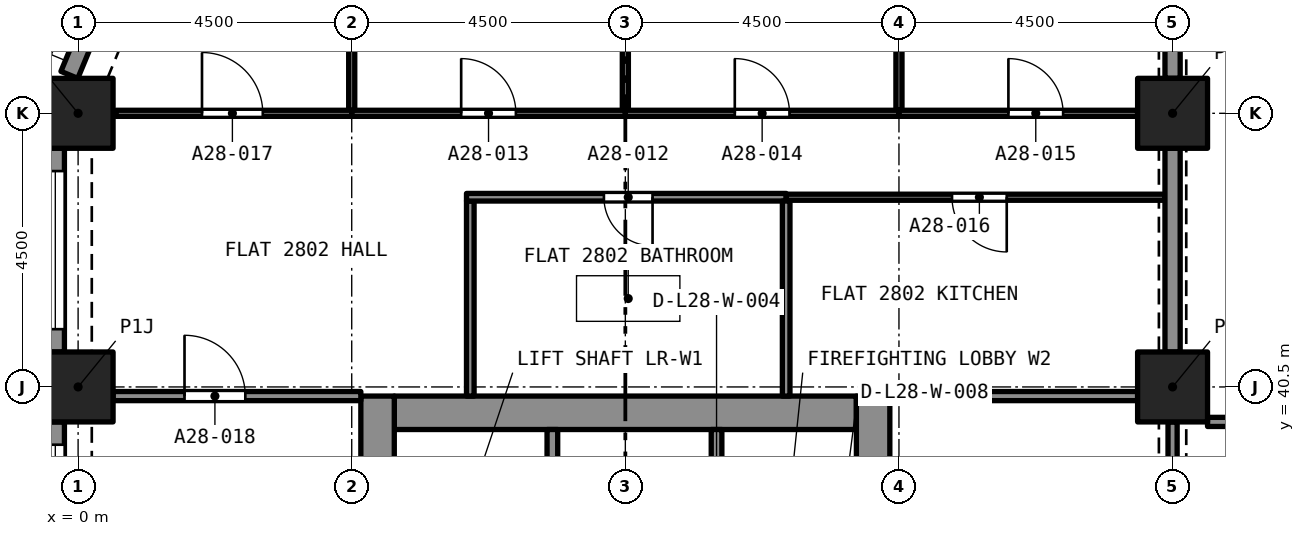
"""IFC4 building model, lengths in metres.
Left out: names, types, materials, properties, quantities, classifications, styles, units other than length and angle.
Written with IfcOpenShell. Run it as: python <this file> out.ifc"""

import sys

from ifc_helpers import new_model, si_unit, direction, frame, frame_2d, origin, origin_2d, place, context, subcontext, project, spatial, rectangle, extrude, element, fill, save


model = new_model("IFC4")
c1 = context("Model", 3, precision=1e-05, world=origin(), true_north=direction((0.0, 1.0)))
c2 = subcontext(c1, "Body", "Model", "MODEL_VIEW")
j1 = project(units=[si_unit("LENGTHUNIT", "METRE"), si_unit("PLANEANGLEUNIT", "RADIAN")], contexts=[c1])
p1 = place(None, origin())
s1 = spatial("IfcSite", under=j1, at=p1, CompositionType="ELEMENT")
p2 = place(p1, origin())
s2 = spatial("IfcBuilding", under=s1, at=p2, CompositionType="ELEMENT")
p3 = place(p2, frame((0.0, 0.0, 102.4)))
s3 = spatial("IfcBuildingStorey", under=s2, at=p3, CompositionType="ELEMENT", Elevation=102.4)
for number, where, z_axis, x_axis in (
    (1, (0.0, 40.5, 0.0), (0.0, 0.0, 1.0), (1.0, 0.0, 0.0)),
    (2, (18.0, 40.5, 0.0), (0.0, 0.0, 1.0), (1.0, 0.0, 0.0)),
    (3, (0.0, 45.0, 0.0), (0.0, 0.0, 1.0), (1.0, 0.0, 0.0)),
    (4, (18.0, 45.0, 0.0), (0.0, 0.0, 1.0), (1.0, 0.0, 0.0)),
):
    element("IfcColumn", number, at=place(p3, frame(where, z_axis=z_axis, x_axis=x_axis)), inside=s3, PredefinedType="COLUMN", context=c2, shape_type="SweptSolid", body=[
        extrude(rectangle(XDim=1.15, YDim=1.15, at=origin_2d()), origin(), (0.0, 0.0, 1.0), 3.2),
    ])
p4 = place(p3, frame((5.2, 40.075, 0.0), z_axis=(0.0, 0.0, 1.0), x_axis=(1.0, 0.0, 0.0)))
e5 = element("IfcWall", 5, at=p4, inside=s3, PredefinedType="SOLIDWALL", context=c2, shape_type="SweptSolid", body=[
    extrude(rectangle(XDim=7.6, YDim=0.55, at=frame_2d((3.8, 0.0))), origin(), (0.0, 0.0, 1.0), 3.2),
])
p5 = place(p3, frame((4.925, 27.15, 0.0), z_axis=(0.0, 0.0, 1.0), x_axis=(0.0, 1.0, 0.0)))
e6 = element("IfcWall", 6, at=p5, inside=s3, PredefinedType="SOLIDWALL", context=c2, shape_type="SweptSolid", body=[
    extrude(rectangle(XDim=13.2, YDim=0.55, at=frame_2d((6.6, 0.0))), origin(), (0.0, 0.0, 1.0), 3.2),
])
p6 = place(p5, frame((8.8, 0.0, 0.0)))
e7 = element("IfcOpeningElement", 7, at=p6, cuts=e6, PredefinedType="OPENING", context=c2, shape_type="SweptSolid", body=[
    extrude(rectangle(XDim=1.2, YDim=2.1, at=frame_2d((0.6, 1.05))), frame((0.0, 0.285, 0.0), z_axis=(0.0, -1.0, 0.0), x_axis=(1.0, 0.0, 0.0)), (0.0, 0.0, 1.0), 0.57),
])
p7 = place(p3, frame((13.075, 27.15, 0.0), z_axis=(0.0, 0.0, 1.0), x_axis=(0.0, 1.0, 0.0)))
e8 = element("IfcWall", 8, at=p7, inside=s3, PredefinedType="SOLIDWALL", context=c2, shape_type="SweptSolid", body=[
    extrude(rectangle(XDim=13.2, YDim=0.55, at=frame_2d((6.6, 0.0))), origin(), (0.0, 0.0, 1.0), 3.2),
])
p8 = place(p7, frame((10.95, 0.0, 0.0)))
e9 = element("IfcOpeningElement", 9, at=p8, cuts=e8, PredefinedType="OPENING", context=c2, shape_type="SweptSolid", body=[
    extrude(rectangle(XDim=1.1, YDim=2.1, at=frame_2d((0.55, 1.05))), frame((0.0, 0.285, 0.0), z_axis=(0.0, -1.0, 0.0), x_axis=(1.0, 0.0, 0.0)), (0.0, 0.0, 1.0), 0.57),
])
p9 = place(p7, frame((8.8, 0.0, 0.0)))
e10 = element("IfcOpeningElement", 10, at=p9, cuts=e8, PredefinedType="OPENING", context=c2, shape_type="SweptSolid", body=[
    extrude(rectangle(XDim=1.2, YDim=2.1, at=frame_2d((0.6, 1.05))), frame((0.0, 0.285, 0.0), z_axis=(0.0, -1.0, 0.0), x_axis=(1.0, 0.0, 0.0)), (0.0, 0.0, 1.0), 0.57),
])
p10 = place(p3, frame((-0.144, 45.632, 0.0), z_axis=(0.0, 0.0, 1.0), x_axis=(0.382723818695, 0.923862802911, 0.0)))
e11 = element("IfcWall", 11, at=p10, inside=s3, PredefinedType="SOLIDWALL", context=c2, shape_type="SweptSolid", body=[
    extrude(rectangle(XDim=2.164, YDim=0.3, at=frame_2d((1.082, 0.0))), origin(), (0.0, 0.0, 1.0), 3.2),
])
p11 = place(p10, frame((0.493, 0.0, 0.45)))
e12 = element("IfcOpeningElement", 12, at=p11, cuts=e11, PredefinedType="OPENING", context=c2, shape_type="SweptSolid", body=[
    extrude(rectangle(XDim=1.4, YDim=1.95, at=frame_2d((0.7, 0.975))), frame((0.0, 0.16, 0.0), z_axis=(0.0, -1.0, 0.0), x_axis=(1.0, 0.0, 0.0)), (0.0, 0.0, 1.0), 0.32),
])
p12 = place(p3, frame((-0.375, 41.075, 0.0), z_axis=(0.0, 0.0, 1.0), x_axis=(0.0, 1.0, 0.0)))
e13 = element("IfcWall", 13, at=p12, inside=s3, PredefinedType="SOLIDWALL", context=c2, shape_type="SweptSolid", body=[
    extrude(rectangle(XDim=3.35, YDim=0.3, at=frame_2d((1.675, 0.0))), origin(), (0.0, 0.0, 1.0), 3.2),
])
p13 = place(p12, frame((0.375, 0.0, 0.45)))
e14 = element("IfcOpeningElement", 14, at=p13, cuts=e13, PredefinedType="OPENING", context=c2, shape_type="SweptSolid", body=[
    extrude(rectangle(XDim=2.6, YDim=1.95, at=frame_2d((1.3, 0.975))), frame((0.0, 0.16, 0.0), z_axis=(0.0, -1.0, 0.0), x_axis=(1.0, 0.0, 0.0)), (0.0, 0.0, 1.0), 0.32),
])
p14 = place(p3, frame((-0.375, 36.575, 0.0), z_axis=(0.0, 0.0, 1.0), x_axis=(0.0, 1.0, 0.0)))
e15 = element("IfcWall", 15, at=p14, inside=s3, PredefinedType="SOLIDWALL", context=c2, shape_type="SweptSolid", body=[
    extrude(rectangle(XDim=3.35, YDim=0.3, at=frame_2d((1.675, 0.0))), origin(), (0.0, 0.0, 1.0), 3.2),
])
p15 = place(p14, frame((0.375, 0.0, 0.45)))
e16 = element("IfcOpeningElement", 16, at=p15, cuts=e15, PredefinedType="OPENING", context=c2, shape_type="SweptSolid", body=[
    extrude(rectangle(XDim=2.6, YDim=1.95, at=frame_2d((1.3, 0.975))), frame((0.0, 0.16, 0.0), z_axis=(0.0, -1.0, 0.0), x_axis=(1.0, 0.0, 0.0)), (0.0, 0.0, 1.0), 0.32),
])
p16 = place(p3, frame((6.45, 40.35, 0.0), z_axis=(0.0, 0.0, 1.0), x_axis=(0.0, 1.0, 0.0)))
e17 = element("IfcWall", 17, at=p16, inside=s3, PredefinedType="PARTITIONING", context=c2, shape_type="SweptSolid", body=[
    extrude(rectangle(XDim=3.208, YDim=0.125, at=frame_2d((1.604, 0.0))), origin(), (0.0, 0.0, 1.0), 2.9),
])
p17 = place(p3, frame((11.645, 43.62, 0.0), z_axis=(0.0, 0.0, 1.0), x_axis=(-1.0, 0.0, 0.0)))
e18 = element("IfcWall", 18, at=p17, inside=s3, PredefinedType="PARTITIONING", context=c2, shape_type="SweptSolid", body=[
    extrude(rectangle(XDim=5.258, YDim=0.125, at=frame_2d((2.629, 0.0))), origin(), (0.0, 0.0, 1.0), 2.9),
])
p18 = place(p17, frame((2.198, 0.0, 0.0)))
e19 = element("IfcOpeningElement", 19, at=p18, cuts=e18, PredefinedType="OPENING", context=c2, shape_type="SweptSolid", body=[
    extrude(rectangle(XDim=0.8, YDim=2.1, at=frame_2d((0.4, 1.05))), frame((0.0, 0.073, 0.0), z_axis=(0.0, -1.0, 0.0), x_axis=(1.0, 0.0, 0.0)), (0.0, 0.0, 1.0), 0.145),
])
p19 = place(p3, frame((11.645, 40.35, 0.0), z_axis=(0.0, 0.0, 1.0), x_axis=(0.0, 1.0, 0.0)))
e20 = element("IfcWall", 20, at=p19, inside=s3, PredefinedType="PARTITIONING", context=c2, shape_type="SweptSolid", body=[
    extrude(rectangle(XDim=3.208, YDim=0.125, at=frame_2d((1.604, 0.0))), origin(), (0.0, 0.0, 1.0), 2.9),
])
p20 = place(p3, frame((9.0, 45.05, 0.0), z_axis=(0.0, 0.0, 1.0), x_axis=(0.0, 1.0, 0.0)))
e21 = element("IfcWall", 21, at=p20, inside=s3, PredefinedType="PARTITIONING", context=c2, shape_type="SweptSolid", body=[
    extrude(rectangle(XDim=3.875, YDim=0.1, at=frame_2d((1.938, 0.0))), origin(), (0.0, 0.0, 1.0), 2.9),
])
p21 = place(p3, frame((4.5, 45.0, 0.0), z_axis=(0.0, 0.0, 1.0), x_axis=(1.0, 0.0, 0.0)))
e22 = element("IfcWall", 22, at=p21, inside=s3, PredefinedType="PARTITIONING", context=c2, shape_type="SweptSolid", body=[
    extrude(rectangle(XDim=4.5, YDim=0.1, at=frame_2d((2.25, 0.0))), origin(), (0.0, 0.0, 1.0), 2.9),
])
p22 = place(p21, frame((1.8, 0.0, 0.0)))
e23 = element("IfcOpeningElement", 23, at=p22, cuts=e22, PredefinedType="OPENING", context=c2, shape_type="SweptSolid", body=[
    extrude(rectangle(XDim=0.9, YDim=2.1, at=frame_2d((0.45, 1.05))), frame((0.0, 0.06, 0.0), z_axis=(0.0, -1.0, 0.0), x_axis=(1.0, 0.0, 0.0)), (0.0, 0.0, 1.0), 0.12),
])
p23 = place(p3, frame((4.5, 45.05, 0.0), z_axis=(0.0, 0.0, 1.0), x_axis=(0.0, 1.0, 0.0)))
e24 = element("IfcWall", 24, at=p23, inside=s3, PredefinedType="PARTITIONING", context=c2, shape_type="SweptSolid", body=[
    extrude(rectangle(XDim=3.828, YDim=0.1, at=frame_2d((1.914, 0.0))), origin(), (0.0, 0.0, 1.0), 2.9),
])
p24 = place(p3, frame((13.5, 45.05, 0.0), z_axis=(0.0, 0.0, 1.0), x_axis=(0.0, 1.0, 0.0)))
e25 = element("IfcWall", 25, at=p24, inside=s3, PredefinedType="PARTITIONING", context=c2, shape_type="SweptSolid", body=[
    extrude(rectangle(XDim=3.875, YDim=0.1, at=frame_2d((1.938, 0.0))), origin(), (0.0, 0.0, 1.0), 2.9),
])
p25 = place(p3, frame((9.0, 45.0, 0.0), z_axis=(0.0, 0.0, 1.0), x_axis=(1.0, 0.0, 0.0)))
e26 = element("IfcWall", 26, at=p25, inside=s3, PredefinedType="PARTITIONING", context=c2, shape_type="SweptSolid", body=[
    extrude(rectangle(XDim=4.5, YDim=0.1, at=frame_2d((2.25, 0.0))), origin(), (0.0, 0.0, 1.0), 2.9),
])
p26 = place(p25, frame((1.8, 0.0, 0.0)))
e27 = element("IfcOpeningElement", 27, at=p26, cuts=e26, PredefinedType="OPENING", context=c2, shape_type="SweptSolid", body=[
    extrude(rectangle(XDim=0.9, YDim=2.1, at=frame_2d((0.45, 1.05))), frame((0.0, 0.06, 0.0), z_axis=(0.0, -1.0, 0.0), x_axis=(1.0, 0.0, 0.0)), (0.0, 0.0, 1.0), 0.12),
])
p27 = place(p3, frame((13.5, 45.0, 0.0), z_axis=(0.0, 0.0, 1.0), x_axis=(1.0, 0.0, 0.0)))
e28 = element("IfcWall", 28, at=p27, inside=s3, PredefinedType="PARTITIONING", context=c2, shape_type="SweptSolid", body=[
    extrude(rectangle(XDim=3.925, YDim=0.1, at=frame_2d((1.962, 0.0))), origin(), (0.0, 0.0, 1.0), 2.9),
])
p28 = place(p27, frame((1.8, 0.0, 0.0)))
e29 = element("IfcOpeningElement", 29, at=p28, cuts=e28, PredefinedType="OPENING", context=c2, shape_type="SweptSolid", body=[
    extrude(rectangle(XDim=0.9, YDim=2.1, at=frame_2d((0.45, 1.05))), frame((0.0, 0.06, 0.0), z_axis=(0.0, -1.0, 0.0), x_axis=(1.0, 0.0, 0.0)), (0.0, 0.0, 1.0), 0.12),
])
p29 = place(p3, frame((18.0, 45.575, 0.0), z_axis=(0.0, 0.0, 1.0), x_axis=(0.0, 1.0, 0.0)))
e30 = element("IfcWall", 30, at=p29, inside=s3, PredefinedType="PARTITIONING", context=c2, shape_type="SweptSolid", body=[
    extrude(rectangle(XDim=3.35, YDim=0.25, at=frame_2d((1.675, 0.0))), origin(), (0.0, 0.0, 1.0), 2.38),
])
p30 = place(p3, frame((17.875, 43.62, 0.0), z_axis=(0.0, 0.0, 1.0), x_axis=(-1.0, 0.0, 0.0)))
e31 = element("IfcWall", 31, at=p30, inside=s3, PredefinedType="PARTITIONING", context=c2, shape_type="SweptSolid", body=[
    extrude(rectangle(XDim=6.23, YDim=0.1, at=frame_2d((3.115, 0.0))), origin(), (0.0, 0.0, 1.0), 2.9),
])
p31 = place(p30, frame((2.602, 0.0, 0.0)))
e32 = element("IfcOpeningElement", 32, at=p31, cuts=e31, PredefinedType="OPENING", context=c2, shape_type="SweptSolid", body=[
    extrude(rectangle(XDim=0.9, YDim=2.1, at=frame_2d((0.45, 1.05))), frame((0.0, 0.06, 0.0), z_axis=(0.0, -1.0, 0.0), x_axis=(1.0, 0.0, 0.0)), (0.0, 0.0, 1.0), 0.12),
])
p32 = place(p3, frame((0.622, 45.0, 0.0), z_axis=(0.0, 0.0, 1.0), x_axis=(1.0, 0.0, 0.0)))
e33 = element("IfcWall", 33, at=p32, inside=s3, PredefinedType="PARTITIONING", context=c2, shape_type="SweptSolid", body=[
    extrude(rectangle(XDim=3.878, YDim=0.1, at=frame_2d((1.939, 0.0))), origin(), (0.0, 0.0, 1.0), 2.9),
])
p33 = place(p32, frame((1.415, 0.0, 0.0)))
e34 = element("IfcOpeningElement", 34, at=p33, cuts=e33, PredefinedType="OPENING", context=c2, shape_type="SweptSolid", body=[
    extrude(rectangle(XDim=1.0, YDim=2.1, at=frame_2d((0.5, 1.05))), frame((0.0, 0.06, 0.0), z_axis=(0.0, -1.0, 0.0), x_axis=(1.0, 0.0, 0.0)), (0.0, 0.0, 1.0), 0.12),
])
p34 = place(p3, frame((0.575, 40.35, 0.0), z_axis=(0.0, 0.0, 1.0), x_axis=(1.0, 0.0, 0.0)))
e35 = element("IfcWall", 35, at=p34, inside=s3, PredefinedType="PARTITIONING", context=c2, shape_type="SweptSolid", body=[
    extrude(rectangle(XDim=4.075, YDim=0.15, at=frame_2d((2.038, 0.0))), origin(), (0.0, 0.0, 1.0), 2.9),
])
p35 = place(p34, frame((1.175, 0.0, 0.0)))
e36 = element("IfcOpeningElement", 36, at=p35, cuts=e35, PredefinedType="OPENING", context=c2, shape_type="SweptSolid", body=[
    extrude(rectangle(XDim=1.0, YDim=2.1, at=frame_2d((0.5, 1.05))), frame((0.0, 0.085, 0.0), z_axis=(0.0, -1.0, 0.0), x_axis=(1.0, 0.0, 0.0)), (0.0, 0.0, 1.0), 0.17),
])
p36 = place(p3, frame((18.0, 41.075, 0.0), z_axis=(0.0, 0.0, 1.0), x_axis=(0.0, 1.0, 0.0)))
e37 = element("IfcWall", 37, at=p36, inside=s3, PredefinedType="PARTITIONING", context=c2, shape_type="SweptSolid", body=[
    extrude(rectangle(XDim=3.35, YDim=0.25, at=frame_2d((1.675, 0.0))), origin(), (0.0, 0.0, 1.0), 2.38),
])
p37 = place(p3, frame((13.35, 40.35, 0.0), z_axis=(0.0, 0.0, 1.0), x_axis=(1.0, 0.0, 0.0)))
e38 = element("IfcWall", 38, at=p37, inside=s3, PredefinedType="PARTITIONING", context=c2, shape_type="SweptSolid", body=[
    extrude(rectangle(XDim=4.075, YDim=0.15, at=frame_2d((2.038, 0.0))), origin(), (0.0, 0.0, 1.0), 2.9),
])
p38 = place(p3, frame((18.575, 39.925, 0.0), z_axis=(0.0, 0.0, 1.0), x_axis=(1.0, 0.0, 0.0)))
e39 = element("IfcWall", 39, at=p38, inside=s3, PredefinedType="PARTITIONING", context=c2, shape_type="SweptSolid", body=[
    extrude(rectangle(XDim=8.425, YDim=0.15, at=frame_2d((4.212, 0.0))), origin(), (0.0, 0.0, 1.0), 2.75),
])
p39 = place(p38, frame((3.425, 0.0, 0.0)))
e40 = element("IfcOpeningElement", 40, at=p39, cuts=e39, PredefinedType="OPENING", context=c2, shape_type="SweptSolid", body=[
    extrude(rectangle(XDim=1.0, YDim=2.1, at=frame_2d((0.5, 1.05))), frame((0.0, 0.085, 0.0), z_axis=(0.0, -1.0, 0.0), x_axis=(1.0, 0.0, 0.0)), (0.0, 0.0, 1.0), 0.17),
])
p40 = place(p3, frame((18.0, 39.925, 0.0), z_axis=(0.0, 0.0, 1.0), x_axis=(0.0, -1.0, 0.0)))
e41 = element("IfcWall", 41, at=p40, inside=s3, PredefinedType="PARTITIONING", context=c2, shape_type="SweptSolid", body=[
    extrude(rectangle(XDim=3.35, YDim=0.15, at=frame_2d((1.675, 0.0))), origin(), (0.0, 0.0, 1.0), 2.38),
])
p41 = place(p40, frame((1.075, 0.0, 0.0)))
e42 = element("IfcOpeningElement", 42, at=p41, cuts=e41, PredefinedType="OPENING", context=c2, shape_type="SweptSolid", body=[
    extrude(rectangle(XDim=1.2, YDim=2.1, at=frame_2d((0.6, 1.05))), frame((0.0, 0.085, 0.0), z_axis=(0.0, -1.0, 0.0), x_axis=(1.0, 0.0, 0.0)), (0.0, 0.0, 1.0), 0.17),
])
p42 = place(p3, frame((7.8, 37.5, 0.0), z_axis=(0.0, 0.0, 1.0), x_axis=(0.0, 1.0, 0.0)))
e43 = element("IfcWall", 43, at=p42, inside=s3, PredefinedType="SOLIDWALL", context=c2, shape_type="SweptSolid", body=[
    extrude(rectangle(XDim=2.3, YDim=0.175, at=frame_2d((1.15, 0.0))), origin(), (0.0, 0.0, 1.0), 2.9),
])
p43 = place(p3, frame((10.5, 37.5, 0.0), z_axis=(0.0, 0.0, 1.0), x_axis=(0.0, 1.0, 0.0)))
e44 = element("IfcWall", 44, at=p43, inside=s3, PredefinedType="SOLIDWALL", context=c2, shape_type="SweptSolid", body=[
    extrude(rectangle(XDim=2.3, YDim=0.175, at=frame_2d((1.15, 0.0))), origin(), (0.0, 0.0, 1.0), 2.9),
])
p44 = place(p43, frame((0.65, 0.0, 0.0)))
e45 = element("IfcOpeningElement", 45, at=p44, cuts=e44, PredefinedType="OPENING", context=c2, shape_type="SweptSolid", body=[
    extrude(rectangle(XDim=1.0, YDim=2.1, at=frame_2d((0.5, 1.05))), frame((0.0, 0.097, 0.0), z_axis=(0.0, -1.0, 0.0), x_axis=(1.0, 0.0, 0.0)), (0.0, 0.0, 1.0), 0.195),
])
p45 = place(p13, origin())
e46 = element("IfcWindow", 46, at=p45, inside=s3, PartitioningType="SINGLE_PANEL", PredefinedType="WINDOW", context=c2, shape_type="SweptSolid", body=[
    extrude(rectangle(XDim=2.6, YDim=1.95, at=frame_2d((1.3, 0.975))), frame((0.0, 0.03, 0.0), z_axis=(0.0, -1.0, 0.0), x_axis=(1.0, 0.0, 0.0)), (0.0, 0.0, 1.0), 0.06),
])
fill(e14, e46)
p46 = place(p15, origin())
e47 = element("IfcWindow", 47, at=p46, inside=s3, PartitioningType="SINGLE_PANEL", PredefinedType="WINDOW", context=c2, shape_type="SweptSolid", body=[
    extrude(rectangle(XDim=2.6, YDim=1.95, at=frame_2d((1.3, 0.975))), frame((0.0, 0.03, 0.0), z_axis=(0.0, -1.0, 0.0), x_axis=(1.0, 0.0, 0.0)), (0.0, 0.0, 1.0), 0.06),
])
fill(e16, e47)
p47 = place(p18, origin())
e48 = element("IfcDoor", 48, at=p47, inside=s3, OperationType="SINGLE_SWING_LEFT", PredefinedType="DOOR", context=c2, shape_type="SweptSolid", body=[
    extrude(rectangle(XDim=0.8, YDim=2.1, at=frame_2d((0.4, 1.05))), frame((0.0, 0.025, 0.0), z_axis=(0.0, -1.0, 0.0), x_axis=(1.0, 0.0, 0.0)), (0.0, 0.0, 1.0), 0.05),
])
fill(e19, e48)
p48 = place(p22, origin())
e49 = element("IfcDoor", 49, at=p48, inside=s3, OperationType="SINGLE_SWING_RIGHT", PredefinedType="DOOR", context=c2, shape_type="SweptSolid", body=[
    extrude(rectangle(XDim=0.9, YDim=2.1, at=frame_2d((0.45, 1.05))), frame((0.0, 0.025, 0.0), z_axis=(0.0, -1.0, 0.0), x_axis=(1.0, 0.0, 0.0)), (0.0, 0.0, 1.0), 0.05),
])
fill(e23, e49)
p49 = place(p26, origin())
e50 = element("IfcDoor", 50, at=p49, inside=s3, OperationType="SINGLE_SWING_LEFT", PredefinedType="DOOR", context=c2, shape_type="SweptSolid", body=[
    extrude(rectangle(XDim=0.9, YDim=2.1, at=frame_2d((0.45, 1.05))), frame((0.0, 0.025, 0.0), z_axis=(0.0, -1.0, 0.0), x_axis=(1.0, 0.0, 0.0)), (0.0, 0.0, 1.0), 0.05),
])
fill(e27, e50)
p50 = place(p28, origin())
e51 = element("IfcDoor", 51, at=p50, inside=s3, OperationType="SINGLE_SWING_RIGHT", PredefinedType="DOOR", context=c2, shape_type="SweptSolid", body=[
    extrude(rectangle(XDim=0.9, YDim=2.1, at=frame_2d((0.45, 1.05))), frame((0.0, 0.025, 0.0), z_axis=(0.0, -1.0, 0.0), x_axis=(1.0, 0.0, 0.0)), (0.0, 0.0, 1.0), 0.05),
])
fill(e29, e51)
p51 = place(p31, origin())
e52 = element("IfcDoor", 52, at=p51, inside=s3, OperationType="SINGLE_SWING_LEFT", PredefinedType="DOOR", context=c2, shape_type="SweptSolid", body=[
    extrude(rectangle(XDim=0.9, YDim=2.1, at=frame_2d((0.45, 1.05))), frame((0.0, 0.025, 0.0), z_axis=(0.0, -1.0, 0.0), x_axis=(1.0, 0.0, 0.0)), (0.0, 0.0, 1.0), 0.05),
])
fill(e32, e52)
p52 = place(p33, origin())
e53 = element("IfcDoor", 53, at=p52, inside=s3, OperationType="SINGLE_SWING_LEFT", PredefinedType="DOOR", context=c2, shape_type="SweptSolid", body=[
    extrude(rectangle(XDim=1.0, YDim=2.1, at=frame_2d((0.5, 1.05))), frame((0.0, 0.025, 0.0), z_axis=(0.0, -1.0, 0.0), x_axis=(1.0, 0.0, 0.0)), (0.0, 0.0, 1.0), 0.05),
])
fill(e34, e53)
p53 = place(p35, origin())
e54 = element("IfcDoor", 54, at=p53, inside=s3, OperationType="SINGLE_SWING_LEFT", PredefinedType="DOOR", context=c2, shape_type="SweptSolid", body=[
    extrude(rectangle(XDim=1.0, YDim=2.1, at=frame_2d((0.5, 1.05))), frame((0.0, 0.025, 0.0), z_axis=(0.0, -1.0, 0.0), x_axis=(1.0, 0.0, 0.0)), (0.0, 0.0, 1.0), 0.05),
])
fill(e36, e54)
save(model, sys.argv[1])
